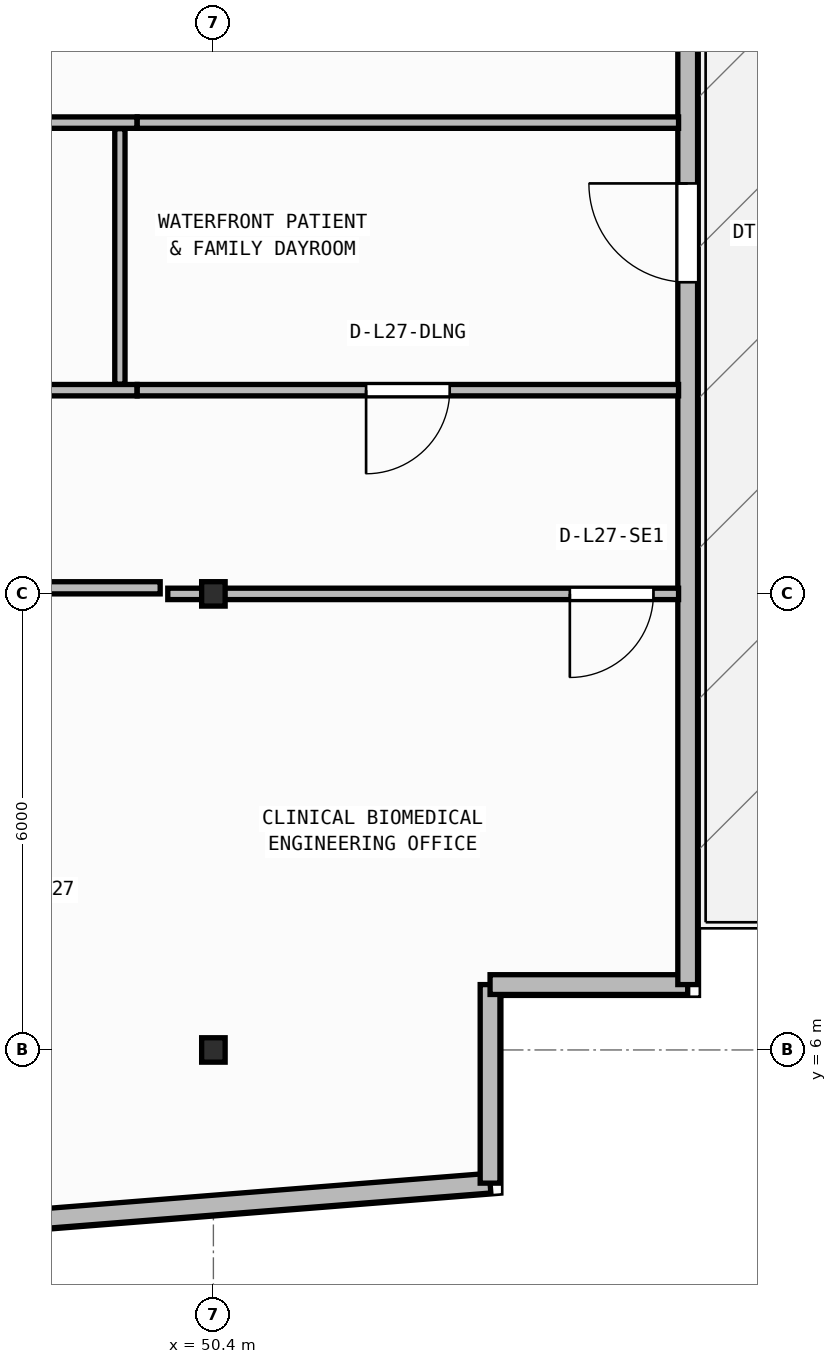
"""IFC4 building model, lengths in metres.
Left out: names, types, materials, properties, quantities, classifications, styles, units other than length and angle.
Written with IfcOpenShell. Run it as: python <this file> out.ifc"""

import sys

from ifc_helpers import new_model, si_unit, direction, frame, frame_2d, origin, origin_2d, place, context, subcontext, project, spatial, rectangle, i_section, extrude, element, fill, save


model = new_model("IFC4")
c1 = context("Model", 3, precision=1e-05, world=origin(), true_north=direction((0.0, 1.0)))
c2 = subcontext(c1, "Body", "Model", "MODEL_VIEW")
j1 = project(units=[si_unit("LENGTHUNIT", "METRE"), si_unit("PLANEANGLEUNIT", "RADIAN")], contexts=[c1])
p1 = place(None, origin())
s1 = spatial("IfcSite", under=j1, at=p1, CompositionType="ELEMENT")
p2 = place(p1, origin())
s2 = spatial("IfcBuilding", under=s1, at=p2, CompositionType="ELEMENT")
p3 = place(p2, frame((0.0, 0.0, 111.25)))
s3 = spatial("IfcBuildingStorey", under=s2, at=p3, CompositionType="ELEMENT", Elevation=111.25)
for number, where, z_axis, x_axis in (
    (1, (50.4, 6.0, 0.0), (0.0, 0.0, 1.0), (1.0, 0.0, 0.0)),
    (2, (50.4, 12.0, 0.0), (0.0, 0.0, 1.0), (1.0, 0.0, 0.0)),
):
    element("IfcColumn", number, at=place(p3, frame(where, z_axis=z_axis, x_axis=x_axis)), inside=s3, PredefinedType="COLUMN", context=c2, shape_type="SweptSolid", body=[
        extrude(i_section(OverallWidth=0.309, OverallDepth=0.321, WebThickness=0.014, FlangeThickness=0.022, FilletRadius=0.017, at=origin_2d()), origin(), (0.0, 0.0, 1.0), 3.95),
    ])
p4 = place(p3, frame((2.76, 0.173, 0.0), z_axis=(0.0, 0.0, 1.0), x_axis=(0.996857931723, 0.079210251617, 0.0)))
e3 = element("IfcWall", 3, at=p4, inside=s3, PredefinedType="STANDARD", context=c2, shape_type="SweptSolid", body=[
    extrude(rectangle(XDim=51.442, YDim=0.26, at=frame_2d((25.721, 0.0))), origin(), (0.0, 0.0, 1.0), 3.71),
])
p5 = place(p4, frame((24.521, 0.0, 0.9)))
e4 = element("IfcOpeningElement", 4, at=p5, cuts=e3, PredefinedType="OPENING", context=c2, shape_type="SweptSolid", body=[
    extrude(rectangle(XDim=2.4, YDim=1.65, at=frame_2d((1.2, 0.825))), frame((0.0, 0.14, 0.0), z_axis=(0.0, -1.0, 0.0), x_axis=(1.0, 0.0, 0.0)), (0.0, 0.0, 1.0), 0.28),
])
p6 = place(p3, frame((54.04, 4.248, 0.0), z_axis=(0.0, 0.0, 1.0), x_axis=(0.0, 1.0, 0.0)))
e5 = element("IfcWall", 5, at=p6, inside=s3, PredefinedType="STANDARD", context=c2, shape_type="SweptSolid", body=[
    extrude(rectangle(XDim=2.612, YDim=0.26, at=frame_2d((1.306, 0.0))), origin(), (0.0, 0.0, 1.0), 3.71),
])
p7 = place(p3, frame((54.04, 6.86, 0.0), z_axis=(0.0, 0.0, 1.0), x_axis=(1.0, 0.0, 0.0)))
e6 = element("IfcWall", 6, at=p7, inside=s3, PredefinedType="STANDARD", context=c2, shape_type="SweptSolid", body=[
    extrude(rectangle(XDim=2.6, YDim=0.26, at=frame_2d((1.3, 0.0))), origin(), (0.0, 0.0, 1.0), 3.71),
])
p8 = place(p3, frame((56.64, 6.86, 0.0), z_axis=(0.0, 0.0, 1.0), x_axis=(0.0, 1.0, 0.0)))
e7 = element("IfcWall", 7, at=p8, inside=s3, PredefinedType="STANDARD", context=c2, shape_type="SweptSolid", body=[
    extrude(rectangle(XDim=23.48, YDim=0.26, at=frame_2d((11.74, 0.0))), origin(), (0.0, 0.0, 1.0), 3.71),
])
p9 = place(p8, frame((9.24, 0.0, 0.0)))
e8 = element("IfcOpeningElement", 8, at=p9, cuts=e7, PredefinedType="OPENING", context=c2, shape_type="SweptSolid", body=[
    extrude(rectangle(XDim=1.3, YDim=2.15, at=frame_2d((0.65, 1.075))), frame((0.0, 0.14, 0.0), z_axis=(0.0, -1.0, 0.0), x_axis=(1.0, 0.0, 0.0)), (0.0, 0.0, 1.0), 0.28),
])
p10 = place(p3, frame((56.52, 12.0, 0.0), z_axis=(0.0, 0.0, 1.0), x_axis=(-1.0, 0.0, 0.0)))
e9 = element("IfcWall", 9, at=p10, inside=s3, PredefinedType="PARTITIONING", context=c2, shape_type="SweptSolid", body=[
    extrude(rectangle(XDim=6.72, YDim=0.15, at=frame_2d((3.36, 0.0))), origin(), (0.0, 0.0, 1.0), 3.083),
])
p11 = place(p10, frame((0.331, 0.0, 0.0)))
e10 = element("IfcOpeningElement", 10, at=p11, cuts=e9, PredefinedType="OPENING", context=c2, shape_type="SweptSolid", body=[
    extrude(rectangle(XDim=1.1, YDim=2.1, at=frame_2d((0.55, 1.05))), frame((0.0, 0.085, 0.0), z_axis=(0.0, -1.0, 0.0), x_axis=(1.0, 0.0, 0.0)), (0.0, 0.0, 1.0), 0.17),
])
p12 = place(p3, frame((49.396, 14.68, 0.0), z_axis=(0.0, 0.0, 1.0), x_axis=(-1.0, 0.0, 0.0)))
e11 = element("IfcWall", 11, at=p12, inside=s3, PredefinedType="PARTITIONING", context=c2, shape_type="SweptSolid", body=[
    extrude(rectangle(XDim=5.668, YDim=0.15, at=frame_2d((2.834, 0.0))), origin(), (0.0, 0.0, 1.0), 3.71),
])
p13 = place(p12, frame((2.284, 0.0, 0.0)))
e12 = element("IfcOpeningElement", 12, at=p13, cuts=e11, PredefinedType="OPENING", context=c2, shape_type="SweptSolid", body=[
    extrude(rectangle(XDim=1.1, YDim=2.1, at=frame_2d((0.55, 1.05))), frame((0.0, 0.085, 0.0), z_axis=(0.0, -1.0, 0.0), x_axis=(1.0, 0.0, 0.0)), (0.0, 0.0, 1.0), 0.17),
])
p14 = place(p3, frame((56.52, 14.68, 0.0), z_axis=(0.0, 0.0, 1.0), x_axis=(-1.0, 0.0, 0.0)))
e13 = element("IfcWall", 13, at=p14, inside=s3, PredefinedType="PARTITIONING", context=c2, shape_type="SweptSolid", body=[
    extrude(rectangle(XDim=7.122, YDim=0.15, at=frame_2d((3.561, 0.0))), origin(), (0.0, 0.0, 1.0), 3.71),
])
p15 = place(p14, frame((3.011, 0.0, 0.0)))
e14 = element("IfcOpeningElement", 14, at=p15, cuts=e13, PredefinedType="OPENING", context=c2, shape_type="SweptSolid", body=[
    extrude(rectangle(XDim=1.1, YDim=2.1, at=frame_2d((0.55, 1.05))), frame((0.0, 0.085, 0.0), z_axis=(0.0, -1.0, 0.0), x_axis=(1.0, 0.0, 0.0)), (0.0, 0.0, 1.0), 0.17),
])
p16 = place(p3, frame((43.728, 18.2, 0.0), z_axis=(0.0, 0.0, 1.0), x_axis=(1.0, 0.0, 0.0)))
e15 = element("IfcWall", 15, at=p16, inside=s3, PredefinedType="PARTITIONING", context=c2, shape_type="SweptSolid", body=[
    extrude(rectangle(XDim=5.668, YDim=0.15, at=frame_2d((2.834, 0.0))), origin(), (0.0, 0.0, 1.0), 3.71),
])
p17 = place(p3, frame((49.398, 18.2, 0.0), z_axis=(0.0, 0.0, 1.0), x_axis=(1.0, 0.0, 0.0)))
e16 = element("IfcWall", 16, at=p17, inside=s3, PredefinedType="PARTITIONING", context=c2, shape_type="SweptSolid", body=[
    extrude(rectangle(XDim=7.122, YDim=0.15, at=frame_2d((3.561, 0.0))), origin(), (0.0, 0.0, 1.0), 3.71),
])
p18 = place(p3, frame((49.17, 14.76, 0.0), z_axis=(0.0, 0.0, 1.0), x_axis=(0.0, 1.0, 0.0)))
e17 = element("IfcWall", 17, at=p18, inside=s3, PredefinedType="PARTITIONING", context=c2, shape_type="SweptSolid", body=[
    extrude(rectangle(XDim=3.36, YDim=0.135, at=frame_2d((1.68, 0.0))), origin(), (0.0, 0.0, 1.0), 3.71),
])
p19 = place(p3, frame((46.689, 12.08, 0.0), z_axis=(0.0, 0.0, 1.0), x_axis=(1.0, 0.0, 0.0)))
e18 = element("IfcWall", 18, at=p19, inside=s3, PredefinedType="PARTITIONING", context=c2, shape_type="SweptSolid", body=[
    extrude(rectangle(XDim=3.011, YDim=0.16, at=frame_2d((1.505, 0.0))), origin(), (0.0, 0.0, 1.0), 3.083),
])
p20 = place(p9, origin())
e19 = element("IfcDoor", 19, at=p20, inside=s3, OperationType="SINGLE_SWING_RIGHT", PredefinedType="DOOR", context=c2, shape_type="SweptSolid", body=[
    extrude(rectangle(XDim=1.3, YDim=2.15, at=frame_2d((0.65, 1.075))), frame((0.0, 0.025, 0.0), z_axis=(0.0, -1.0, 0.0), x_axis=(1.0, 0.0, 0.0)), (0.0, 0.0, 1.0), 0.05),
])
fill(e8, e19)
p21 = place(p11, origin())
e20 = element("IfcDoor", 20, at=p21, inside=s3, OperationType="SINGLE_SWING_RIGHT", PredefinedType="DOOR", context=c2, shape_type="SweptSolid", body=[
    extrude(rectangle(XDim=1.1, YDim=2.1, at=frame_2d((0.55, 1.05))), frame((0.0, 0.025, 0.0), z_axis=(0.0, -1.0, 0.0), x_axis=(1.0, 0.0, 0.0)), (0.0, 0.0, 1.0), 0.05),
])
fill(e10, e20)
p22 = place(p15, origin())
e21 = element("IfcDoor", 21, at=p22, inside=s3, OperationType="SINGLE_SWING_RIGHT", PredefinedType="DOOR", context=c2, shape_type="SweptSolid", body=[
    extrude(rectangle(XDim=1.1, YDim=2.1, at=frame_2d((0.55, 1.05))), frame((0.0, 0.025, 0.0), z_axis=(0.0, -1.0, 0.0), x_axis=(1.0, 0.0, 0.0)), (0.0, 0.0, 1.0), 0.05),
])
fill(e14, e21)
save(model, sys.argv[1])
